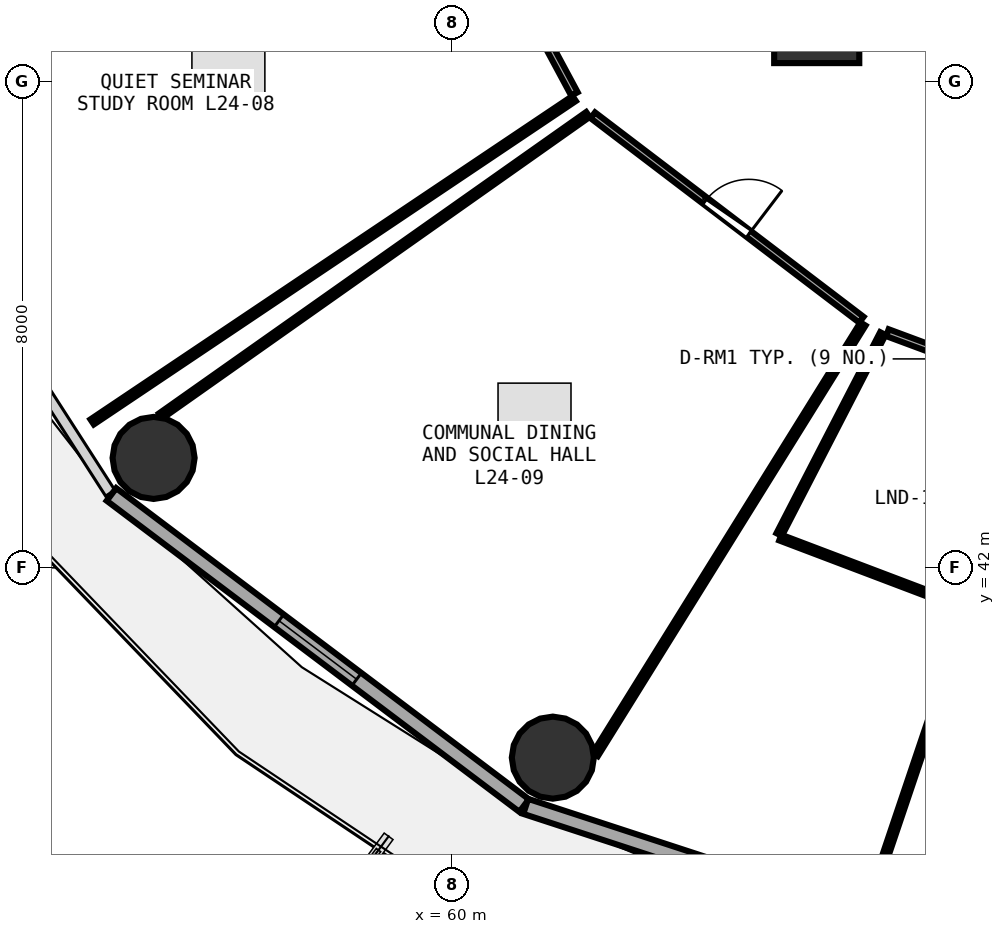
"""IFC4 building model, lengths in metres.
Left out: names, types, materials, properties, quantities, classifications, styles, units other than length and angle.
Written with IfcOpenShell. Run it as: python <this file> out.ifc"""

import sys

from ifc_helpers import new_model, si_unit, direction, frame, frame_2d, origin, origin_2d, place, context, subcontext, project, spatial, rectangle, circle, extrude, element, fill, save


model = new_model("IFC4")
c1 = context("Model", 3, precision=1e-05, world=origin(), true_north=direction((0.0, 1.0)))
c2 = subcontext(c1, "Body", "Model", "MODEL_VIEW")
j1 = project(units=[si_unit("LENGTHUNIT", "METRE"), si_unit("PLANEANGLEUNIT", "RADIAN")], contexts=[c1])
p1 = place(None, origin())
s1 = spatial("IfcSite", under=j1, at=p1, CompositionType="ELEMENT")
p2 = place(p1, origin())
s2 = spatial("IfcBuilding", under=s1, at=p2, CompositionType="ELEMENT")
p3 = place(p2, frame((0.0, 0.0, 95.1)))
s3 = spatial("IfcBuildingStorey", under=s2, at=p3, CompositionType="ELEMENT", Elevation=95.1)
p4 = place(p3, frame((66.0, 51.0, 0.0), z_axis=(0.0, 0.0, 1.0), x_axis=(1.0, 0.0, 0.0)))
e1 = element("IfcColumn", 1, at=p4, inside=s3, PredefinedType="PILASTER", context=c2, shape_type="SweptSolid", body=[
    extrude(rectangle(XDim=1.4, YDim=1.4, at=origin_2d()), origin(), (0.0, 0.0, 1.0), 3.75),
])
for number, where, z_axis, x_axis in (
    (2, (55.094, 43.807, 0.0), (0.0, 0.0, 1.0), (1.0, 0.0, 0.0)),
    (3, (61.66, 38.878, 0.0), (0.0, 0.0, 1.0), (1.0, 0.0, 0.0)),
):
    element("IfcColumn", number, at=place(p3, frame(where, z_axis=z_axis, x_axis=x_axis)), inside=s3, PredefinedType="COLUMN", context=c2, shape_type="SweptSolid", body=[
        extrude(circle(Radius=0.675, at=origin_2d()), origin(), (0.0, 0.0, 1.0), 3.75),
    ])
p5 = place(p3, frame((54.401, 43.207, 0.0), z_axis=(0.0, 0.0, 1.0), x_axis=(0.798501507879, -0.601992808857, 0.0)))
e4 = element("IfcWall", 4, at=p5, inside=s3, PredefinedType="SOLIDWALL", context=c2, shape_type="SweptSolid", body=[
    extrude(rectangle(XDim=8.499, YDim=0.26, at=frame_2d((4.25, 0.0))), origin(), (0.0, 0.0, 1.0), 3.475),
])
p6 = place(p5, frame((3.45, 0.0, 0.85)))
e5 = element("IfcOpeningElement", 5, at=p6, cuts=e4, PredefinedType="OPENING", context=c2, shape_type="SweptSolid", body=[
    extrude(rectangle(XDim=1.6, YDim=1.45, at=frame_2d((0.8, 0.725))), frame((0.0, 0.14, 0.0), z_axis=(0.0, -1.0, 0.0), x_axis=(1.0, 0.0, 0.0)), (0.0, 0.0, 1.0), 0.28),
])
p7 = place(p3, frame((61.214, 38.077, 0.0), z_axis=(0.0, 0.0, 1.0), x_axis=(0.950471101963, -0.310812941064, 0.0)))
e6 = element("IfcWall", 6, at=p7, inside=s3, PredefinedType="SOLIDWALL", context=c2, shape_type="SweptSolid", body=[
    extrude(rectangle(XDim=8.76, YDim=0.26, at=frame_2d((4.38, 0.0))), origin(), (0.0, 0.0, 1.0), 3.475),
])
p8 = place(p7, frame((3.58, 0.0, 0.85)))
e7 = element("IfcOpeningElement", 7, at=p8, cuts=e6, PredefinedType="OPENING", context=c2, shape_type="SweptSolid", body=[
    extrude(rectangle(XDim=1.6, YDim=1.45, at=frame_2d((0.8, 0.725))), frame((0.0, 0.14, 0.0), z_axis=(0.0, -1.0, 0.0), x_axis=(1.0, 0.0, 0.0)), (0.0, 0.0, 1.0), 0.28),
])
p9 = place(p3, frame((59.49, 54.488, 0.0), z_axis=(0.0, 0.0, 1.0), x_axis=(0.473630069111, -0.880723882743, 0.0)))
e8 = element("IfcWall", 8, at=p9, inside=s3, PredefinedType="PARTITIONING", context=c2, shape_type="SweptSolid", body=[
    extrude(rectangle(XDim=5.332, YDim=0.12, at=frame_2d((2.666, 0.0))), origin(), (0.0, 0.0, 1.0), 2.925),
])
p10 = place(p9, frame((2.216, 0.0, 0.0)))
e9 = element("IfcOpeningElement", 9, at=p10, cuts=e8, PredefinedType="OPENING", context=c2, shape_type="SweptSolid", body=[
    extrude(rectangle(XDim=0.9, YDim=2.08, at=frame_2d((0.45, 1.04))), frame((0.0, 0.07, 0.0), z_axis=(0.0, -1.0, 0.0), x_axis=(1.0, 0.0, 0.0)), (0.0, 0.0, 1.0), 0.14),
])
p11 = place(p3, frame((62.318, 49.442, 0.0), z_axis=(0.0, 0.0, 1.0), x_axis=(0.795762794985, -0.605608432997, 0.0)))
e10 = element("IfcWall", 10, at=p11, inside=s3, PredefinedType="PARTITIONING", context=c2, shape_type="SweptSolid", body=[
    extrude(rectangle(XDim=5.55, YDim=0.12, at=frame_2d((2.775, 0.0))), origin(), (0.0, 0.0, 1.0), 2.925),
])
p12 = place(p11, frame((2.325, 0.0, 0.0)))
e11 = element("IfcOpeningElement", 11, at=p12, cuts=e10, PredefinedType="OPENING", context=c2, shape_type="SweptSolid", body=[
    extrude(rectangle(XDim=0.9, YDim=2.08, at=frame_2d((0.45, 1.04))), frame((0.0, 0.07, 0.0), z_axis=(0.0, -1.0, 0.0), x_axis=(1.0, 0.0, 0.0)), (0.0, 0.0, 1.0), 0.14),
])
p13 = place(p3, frame((67.162, 45.867, 0.0), z_axis=(0.0, 0.0, 1.0), x_axis=(0.937401389833, -0.348250821018, 0.0)))
e12 = element("IfcWall", 12, at=p13, inside=s3, PredefinedType="PARTITIONING", context=c2, shape_type="SweptSolid", body=[
    extrude(rectangle(XDim=2.479, YDim=0.12, at=frame_2d((1.24, 0.0))), origin(), (0.0, 0.0, 1.0), 2.925),
])
p14 = place(p13, frame((0.789, 0.0, 0.0)))
e13 = element("IfcOpeningElement", 13, at=p14, cuts=e12, PredefinedType="OPENING", context=c2, shape_type="SweptSolid", body=[
    extrude(rectangle(XDim=0.9, YDim=2.08, at=frame_2d((0.45, 1.04))), frame((0.0, 0.07, 0.0), z_axis=(0.0, -1.0, 0.0), x_axis=(1.0, 0.0, 0.0)), (0.0, 0.0, 1.0), 0.14),
])
p15 = place(p3, frame((62.011, 49.718, 0.0), z_axis=(0.0, 0.0, 1.0), x_axis=(-0.830433607217, -0.557117603388, 0.0)))
e14 = element("IfcWall", 14, at=p15, inside=s3, PredefinedType="PARTITIONING", context=c2, shape_type="SweptSolid", body=[
    extrude(rectangle(XDim=9.546, YDim=0.1, at=frame_2d((4.773, 0.0))), origin(), (0.0, 0.0, 1.0), 2.975),
])
p16 = place(p3, frame((66.761, 46.01, 0.0), z_axis=(0.0, 0.0, 1.0), x_axis=(-0.528015738644, -0.849234584638, 0.0)))
e15 = element("IfcWall", 15, at=p16, inside=s3, PredefinedType="PARTITIONING", context=c2, shape_type="SweptSolid", body=[
    extrude(rectangle(XDim=8.338, YDim=0.1, at=frame_2d((4.169, 0.0))), origin(), (0.0, 0.0, 1.0), 3.175),
])
p17 = place(p3, frame((55.21, 44.498, 0.0), z_axis=(0.0, 0.0, 1.0), x_axis=(0.817133838915, 0.576447993578, 0.0)))
e16 = element("IfcWall", 16, at=p17, inside=s3, PredefinedType="PARTITIONING", context=c2, shape_type="SweptSolid", body=[
    extrude(rectangle(XDim=8.6, YDim=0.1, at=frame_2d((4.3, 0.0))), origin(), (0.0, 0.0, 1.0), 3.175),
])
p18 = place(p3, frame((68.378, 41.368, 0.0), z_axis=(0.0, 0.0, 1.0), x_axis=(-0.935027341219, 0.354575621233, 0.0)))
e17 = element("IfcWall", 17, at=p18, inside=s3, PredefinedType="PARTITIONING", context=c2, shape_type="SweptSolid", body=[
    extrude(rectangle(XDim=3.183, YDim=0.1, at=frame_2d((1.592, 0.0))), origin(), (0.0, 0.0, 1.0), 2.925),
])
p19 = place(p3, frame((65.382, 42.546, 0.0), z_axis=(0.0, 0.0, 1.0), x_axis=(0.458413879464, 0.888738834031, 0.0)))
e18 = element("IfcWall", 18, at=p19, inside=s3, PredefinedType="PARTITIONING", context=c2, shape_type="SweptSolid", body=[
    extrude(rectangle(XDim=3.72, YDim=0.1, at=frame_2d((1.86, 0.0))), origin(), (0.0, 0.0, 1.0), 3.175),
])
p20 = place(p3, frame((66.867, 36.49, 0.0), z_axis=(0.0, 0.0, 1.0), x_axis=(0.319911741109, 0.947447348353, 0.0)))
e19 = element("IfcWall", 19, at=p20, inside=s3, PredefinedType="PARTITIONING", context=c2, shape_type="SweptSolid", body=[
    extrude(rectangle(XDim=5.146, YDim=0.1, at=frame_2d((2.573, 0.0))), origin(), (0.0, 0.0, 1.0), 2.925),
])
p21 = place(p6, origin())
e20 = element("IfcWindow", 20, at=p21, inside=s3, PartitioningType="SINGLE_PANEL", PredefinedType="WINDOW", context=c2, shape_type="SweptSolid", body=[
    extrude(rectangle(XDim=1.6, YDim=1.45, at=frame_2d((0.8, 0.725))), frame((0.0, 0.03, 0.0), z_axis=(0.0, -1.0, 0.0), x_axis=(1.0, 0.0, 0.0)), (0.0, 0.0, 1.0), 0.06),
])
fill(e5, e20)
p22 = place(p12, origin())
e21 = element("IfcDoor", 21, at=p22, inside=s3, OperationType="SINGLE_SWING_RIGHT", PredefinedType="DOOR", context=c2, shape_type="SweptSolid", body=[
    extrude(rectangle(XDim=0.9, YDim=2.08, at=frame_2d((0.45, 1.04))), frame((0.0, 0.025, 0.0), z_axis=(0.0, -1.0, 0.0), x_axis=(1.0, 0.0, 0.0)), (0.0, 0.0, 1.0), 0.05),
])
fill(e11, e21)
save(model, sys.argv[1])
